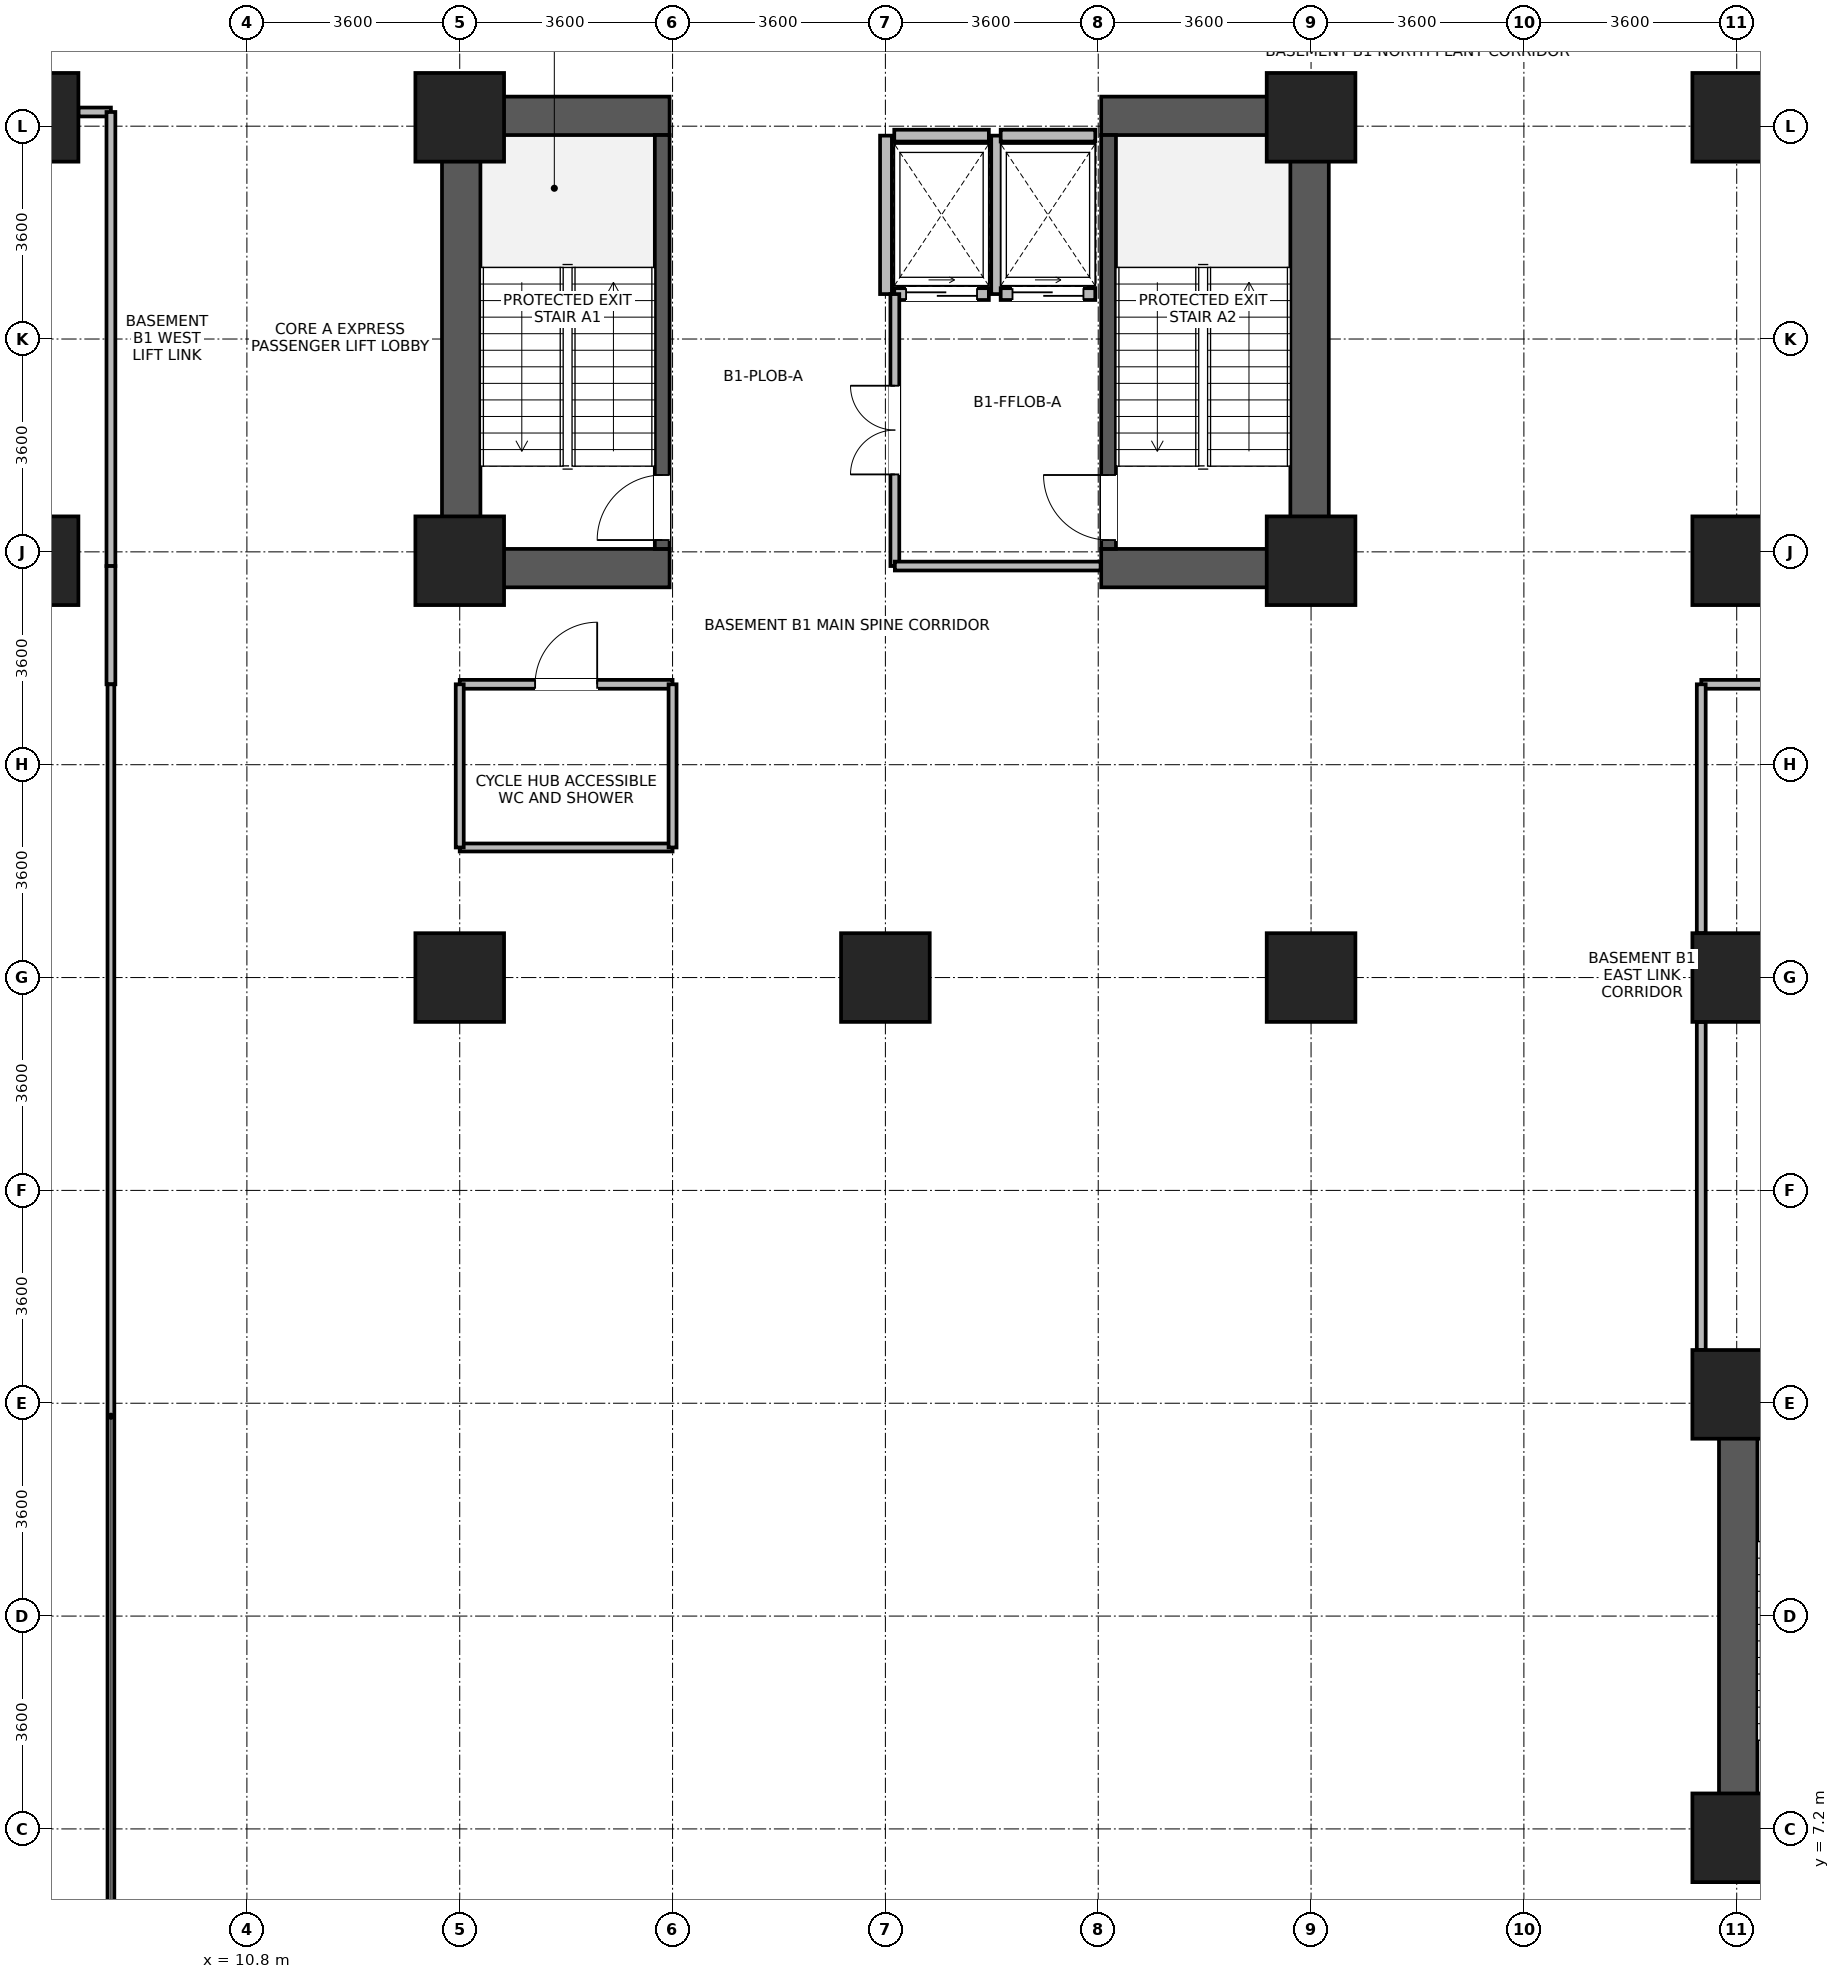
"""IFC4 building model, lengths in metres.
Left out: names, types, materials, properties, quantities, classifications, styles, units other than length and angle.
Written with IfcOpenShell. Run it as: python <this file> out.ifc"""

import sys

from ifc_helpers import new_model, si_unit, direction, frame, frame_2d, origin, origin_2d, place, context, subcontext, project, spatial, rectangle, extrude, source, transform, mapped, element, fill, save


model = new_model("IFC4")
c1 = context("Model", 3, precision=1e-05, world=origin(), true_north=direction((0.0, 1.0)))
c2 = subcontext(c1, "Body", "Model", "MODEL_VIEW")
j1 = project(units=[si_unit("LENGTHUNIT", "METRE"), si_unit("PLANEANGLEUNIT", "RADIAN")], contexts=[c1])
p1 = place(None, origin())
s1 = spatial("IfcSite", under=j1, at=p1, CompositionType="ELEMENT")
p2 = place(p1, origin())
s2 = spatial("IfcBuilding", under=s1, at=p2, CompositionType="ELEMENT")
p3 = place(p2, frame((0.0, 0.0, -4.5)))
s3 = spatial("IfcBuildingStorey", under=s2, at=p3, CompositionType="ELEMENT", Elevation=-4.5)
for number, where, z_axis, x_axis in (
    (1, (14.425, 28.2, 0.0), (0.0, 0.0, 1.0), (0.0, 1.0, 0.0)),
    (2, (28.775, 28.2, 0.0), (0.0, 0.0, 1.0), (0.0, 1.0, 0.0)),
):
    element("IfcWall", number, at=place(p3, frame(where, z_axis=z_axis, x_axis=x_axis)), inside=s3, PredefinedType="SHEAR", context=c2, shape_type="SweptSolid", body=[
        extrude(rectangle(XDim=8.3, YDim=0.65, at=frame_2d((4.15, 0.0))), origin(), (0.0, 0.0, 1.0), 4.15),
    ])
for number, where, z_axis, x_axis in (
    (3, (14.75, 28.525, 0.0), (0.0, 0.0, 1.0), (1.0, 0.0, 0.0)),
    (4, (25.25, 28.525, 0.0), (0.0, 0.0, 1.0), (1.0, 0.0, 0.0)),
    (5, (14.75, 36.175, 0.0), (0.0, 0.0, 1.0), (1.0, 0.0, 0.0)),
    (6, (25.25, 36.175, 0.0), (0.0, 0.0, 1.0), (1.0, 0.0, 0.0)),
):
    element("IfcWall", number, at=place(p3, frame(where, z_axis=z_axis, x_axis=x_axis)), inside=s3, PredefinedType="SHEAR", context=c2, shape_type="SweptSolid", body=[
        extrude(rectangle(XDim=3.2, YDim=0.65, at=frame_2d((1.6, 0.0))), origin(), (0.0, 0.0, 1.0), 4.15),
    ])
p4 = place(p3, frame((17.825, 28.85, 0.0), z_axis=(0.0, 0.0, 1.0), x_axis=(0.0, 1.0, 0.0)))
e7 = element("IfcWall", 7, at=p4, inside=s3, PredefinedType="SHEAR", context=c2, shape_type="SweptSolid", body=[
    extrude(rectangle(XDim=7.0, YDim=0.25, at=frame_2d((3.5, 0.0))), origin(), (0.0, 0.0, 1.0), 4.15),
])
p5 = place(p4, frame((0.15, 0.0, 0.0)))
e8 = element("IfcOpeningElement", 8, at=p5, cuts=e7, PredefinedType="OPENING", context=c2, shape_type="SweptSolid", body=[
    extrude(rectangle(XDim=1.1, YDim=2.08, at=frame_2d((0.55, 1.04))), frame((0.0, 0.135, 0.0), z_axis=(0.0, -1.0, 0.0), x_axis=(1.0, 0.0, 0.0)), (0.0, 0.0, 1.0), 0.27),
])
p6 = place(p3, frame((25.375, 28.85, 0.0), z_axis=(0.0, 0.0, 1.0), x_axis=(0.0, 1.0, 0.0)))
e9 = element("IfcWall", 9, at=p6, inside=s3, PredefinedType="SHEAR", context=c2, shape_type="SweptSolid", body=[
    extrude(rectangle(XDim=7.0, YDim=0.25, at=frame_2d((3.5, 0.0))), origin(), (0.0, 0.0, 1.0), 4.15),
])
p7 = place(p6, frame((0.15, 0.0, 0.0)))
e10 = element("IfcOpeningElement", 10, at=p7, cuts=e9, PredefinedType="OPENING", context=c2, shape_type="SweptSolid", body=[
    extrude(rectangle(XDim=1.1, YDim=2.08, at=frame_2d((0.55, 1.04))), frame((0.0, 0.135, 0.0), z_axis=(0.0, -1.0, 0.0), x_axis=(1.0, 0.0, 0.0)), (0.0, 0.0, 1.0), 0.27),
])
p8 = place(p3, frame((36.025, 6.65, 0.0), z_axis=(0.0, 0.0, 1.0), x_axis=(0.0, 1.0, 0.0)))
e11 = element("IfcWall", 11, at=p8, inside=s3, PredefinedType="SHEAR", context=c2, shape_type="SweptSolid", body=[
    extrude(rectangle(XDim=8.3, YDim=0.65, at=frame_2d((4.15, 0.0))), origin(), (0.0, 0.0, 1.0), 4.15),
])
for number, where, z_axis, x_axis in (
    (12, (36.35, 6.975, 0.0), (0.0, 0.0, 1.0), (1.0, 0.0, 0.0)),
    (13, (36.35, 14.625, 0.0), (0.0, 0.0, 1.0), (1.0, 0.0, 0.0)),
):
    element("IfcWall", number, at=place(p3, frame(where, z_axis=z_axis, x_axis=x_axis)), inside=s3, PredefinedType="SHEAR", context=c2, shape_type="SweptSolid", body=[
        extrude(rectangle(XDim=3.2, YDim=0.65, at=frame_2d((1.6, 0.0))), origin(), (0.0, 0.0, 1.0), 4.15),
    ])
m1 = source(origin(), c2, "Body", "SweptSolid", [
    extrude(rectangle(XDim=1.5, YDim=1.5, at=origin_2d()), origin(), (0.0, 0.0, 1.0), 4.5),
])
for number, where, z_axis, x_axis in (
    (14, (7.2, 28.65, 0.0), (0.0, 0.0, 1.0), (1.0, 0.0, 0.0)),
    (15, (7.2, 36.15, 0.0), (0.0, 0.0, 1.0), (1.0, 0.0, 0.0)),
    (16, (14.4, 21.6, 0.0), (0.0, 0.0, 1.0), (1.0, 0.0, 0.0)),
    (17, (14.4, 28.65, 0.0), (0.0, 0.0, 1.0), (1.0, 0.0, 0.0)),
    (18, (14.4, 36.15, 0.0), (0.0, 0.0, 1.0), (1.0, 0.0, 0.0)),
    (19, (21.6, 21.6, 0.0), (0.0, 0.0, 1.0), (1.0, 0.0, 0.0)),
    (20, (28.8, 21.6, 0.0), (0.0, 0.0, 1.0), (1.0, 0.0, 0.0)),
    (21, (28.8, 28.65, 0.0), (0.0, 0.0, 1.0), (1.0, 0.0, 0.0)),
    (22, (28.8, 36.15, 0.0), (0.0, 0.0, 1.0), (1.0, 0.0, 0.0)),
    (23, (36.0, 21.6, 0.0), (0.0, 0.0, 1.0), (1.0, 0.0, 0.0)),
    (24, (36.0, 28.65, 0.0), (0.0, 0.0, 1.0), (1.0, 0.0, 0.0)),
    (25, (36.0, 36.15, 0.0), (0.0, 0.0, 1.0), (1.0, 0.0, 0.0)),
    (26, (36.0, 7.05, 0.0), (0.0, 0.0, 1.0), (1.0, 0.0, 0.0)),
    (27, (36.0, 14.55, 0.0), (0.0, 0.0, 1.0), (1.0, 0.0, 0.0)),
):
    element("IfcColumn", number, at=place(p3, frame(where, z_axis=z_axis, x_axis=x_axis)), inside=s3, PredefinedType="COLUMN", context=c2, shape_type="MappedRepresentation", body=[
        mapped(m1, transform((0.0, 0.0, 0.0), x_axis=(1.0, 0.0, 0.0), y_axis=(0.0, 1.0, 0.0), z_axis=(0.0, 0.0, 1.0), scale=1.0)),
    ])
p9 = place(p3, frame((21.75, 33.16, 0.0), z_axis=(0.0, 0.0, 1.0), x_axis=(1.0, 0.0, 0.0)))
e28 = element("IfcWall", 28, at=p9, inside=s3, PredefinedType="PARTITIONING", context=c2, shape_type="SweptSolid", body=[
    extrude(rectangle(XDim=1.6, YDim=0.2, at=frame_2d((0.8, 0.0))), origin(), (0.0, 0.0, 1.0), 4.13),
])
p10 = place(p9, frame((0.2, 0.0, 0.0)))
e29 = element("IfcOpeningElement", 29, at=p10, cuts=e28, PredefinedType="OPENING", context=c2, shape_type="SweptSolid", body=[
    extrude(rectangle(XDim=1.2, YDim=2.12, at=frame_2d((0.6, 1.06))), frame((0.0, 0.11, 0.0), z_axis=(0.0, -1.0, 0.0), x_axis=(1.0, 0.0, 0.0)), (0.0, 0.0, 1.0), 0.22),
])
p11 = place(p3, frame((21.75, 35.84, 0.0), z_axis=(0.0, 0.0, 1.0), x_axis=(1.0, 0.0, 0.0)))
e30 = element("IfcWall", 30, at=p11, inside=s3, PredefinedType="PARTITIONING", context=c2, shape_type="SweptSolid", body=[
    extrude(rectangle(XDim=1.6, YDim=0.2, at=frame_2d((0.8, 0.0))), origin(), (0.0, 0.0, 1.0), 2.93),
])
for number, where, z_axis, x_axis in (
    (31, (21.61, 33.16, 0.0), (0.0, 0.0, 1.0), (0.0, 1.0, 0.0)),
    (32, (23.49, 33.16, 0.0), (0.0, 0.0, 1.0), (0.0, 1.0, 0.0)),
):
    element("IfcWall", number, at=place(p3, frame(where, z_axis=z_axis, x_axis=x_axis)), inside=s3, PredefinedType="PARTITIONING", context=c2, shape_type="SweptSolid", body=[
        extrude(rectangle(XDim=2.68, YDim=0.2, at=frame_2d((1.34, 0.0))), origin(), (0.0, 0.0, 1.0), 4.13),
    ])
p12 = place(p3, frame((23.55, 33.16, 0.0), z_axis=(0.0, 0.0, 1.0), x_axis=(1.0, 0.0, 0.0)))
e33 = element("IfcWall", 33, at=p12, inside=s3, PredefinedType="PARTITIONING", context=c2, shape_type="SweptSolid", body=[
    extrude(rectangle(XDim=1.6, YDim=0.2, at=frame_2d((0.8, 0.0))), origin(), (0.0, 0.0, 1.0), 4.13),
])
p13 = place(p12, frame((0.2, 0.0, 0.0)))
e34 = element("IfcOpeningElement", 34, at=p13, cuts=e33, PredefinedType="OPENING", context=c2, shape_type="SweptSolid", body=[
    extrude(rectangle(XDim=1.2, YDim=2.12, at=frame_2d((0.6, 1.06))), frame((0.0, 0.11, 0.0), z_axis=(0.0, -1.0, 0.0), x_axis=(1.0, 0.0, 0.0)), (0.0, 0.0, 1.0), 0.22),
])
p14 = place(p3, frame((23.55, 35.84, 0.0), z_axis=(0.0, 0.0, 1.0), x_axis=(1.0, 0.0, 0.0)))
e35 = element("IfcWall", 35, at=p14, inside=s3, PredefinedType="PARTITIONING", context=c2, shape_type="SweptSolid", body=[
    extrude(rectangle(XDim=1.6, YDim=0.2, at=frame_2d((0.8, 0.0))), origin(), (0.0, 0.0, 1.0), 2.93),
])
p15 = place(p3, frame((7.95, 36.24, 0.0), z_axis=(0.0, 0.0, 1.0), x_axis=(1.0, 0.0, 0.0)))
e36 = element("IfcWall", 36, at=p15, inside=s3, PredefinedType="PARTITIONING", context=c2, shape_type="SweptSolid", body=[
    extrude(rectangle(XDim=0.55, YDim=0.15, at=frame_2d((0.275, 0.0))), origin(), (0.0, 0.0, 1.0), 3.43),
])
p16 = place(p3, frame((35.4, 26.56, 0.0), z_axis=(0.0, 0.0, 1.0), x_axis=(1.0, 0.0, 0.0)))
e37 = element("IfcWall", 37, at=p16, inside=s3, PredefinedType="PARTITIONING", context=c2, shape_type="SweptSolid", body=[
    extrude(rectangle(XDim=18.6, YDim=0.15, at=frame_2d((9.3, 0.0))), origin(), (0.0, 0.0, 1.0), 4.13),
])
p17 = place(p16, frame((8.87, 0.0, 0.0)))
e38 = element("IfcOpeningElement", 38, at=p17, cuts=e37, PredefinedType="OPENING", context=c2, shape_type="SweptSolid", body=[
    extrude(rectangle(XDim=0.86, YDim=2.02, at=frame_2d((0.43, 1.01))), frame((0.0, 0.085, 0.0), z_axis=(0.0, -1.0, 0.0), x_axis=(1.0, 0.0, 0.0)), (0.0, 0.0, 1.0), 0.17),
])
p18 = place(p3, frame((35.4, 15.3, 0.0), z_axis=(0.0, 0.0, 1.0), x_axis=(0.0, 1.0, 0.0)))
e39 = element("IfcWall", 39, at=p18, inside=s3, PredefinedType="PARTITIONING", context=c2, shape_type="SweptSolid", body=[
    extrude(rectangle(XDim=5.55, YDim=0.15, at=frame_2d((2.775, 0.0))), origin(), (0.0, 0.0, 1.0), 4.13),
])
p19 = place(p3, frame((35.4, 22.35, 0.0), z_axis=(0.0, 0.0, 1.0), x_axis=(0.0, 1.0, 0.0)))
e40 = element("IfcWall", 40, at=p19, inside=s3, PredefinedType="PARTITIONING", context=c2, shape_type="SweptSolid", body=[
    extrude(rectangle(XDim=4.21, YDim=0.15, at=frame_2d((2.105, 0.0))), origin(), (0.0, 0.0, 1.0), 4.13),
])
p20 = place(p3, frame((8.5, 28.56, 0.0), z_axis=(0.0, 0.0, 1.0), x_axis=(0.0, 1.0, 0.0)))
e41 = element("IfcWall", 41, at=p20, inside=s3, PredefinedType="PARTITIONING", context=c2, shape_type="SweptSolid", body=[
    extrude(rectangle(XDim=7.68, YDim=0.15, at=frame_2d((3.84, 0.0))), origin(), (0.0, 0.0, 1.0), 4.13),
])
p21 = place(p3, frame((14.4, 26.56, 0.0), z_axis=(0.0, 0.0, 1.0), x_axis=(1.0, 0.0, 0.0)))
e42 = element("IfcWall", 42, at=p21, inside=s3, PredefinedType="PARTITIONING", context=c2, shape_type="SweptSolid", body=[
    extrude(rectangle(XDim=3.6, YDim=0.15, at=frame_2d((1.8, 0.0))), origin(), (0.0, 0.0, 1.0), 4.13),
])
p22 = place(p21, frame((1.275, 0.0, 0.0)))
e43 = element("IfcOpeningElement", 43, at=p22, cuts=e42, PredefinedType="OPENING", context=c2, shape_type="SweptSolid", body=[
    extrude(rectangle(XDim=1.05, YDim=2.12, at=frame_2d((0.525, 1.06))), frame((0.0, 0.085, 0.0), z_axis=(0.0, -1.0, 0.0), x_axis=(1.0, 0.0, 0.0)), (0.0, 0.0, 1.0), 0.17),
])
p23 = place(p3, frame((8.5, 26.56, 0.0), z_axis=(0.0, 0.0, 1.0), x_axis=(0.0, 1.0, 0.0)))
e44 = element("IfcWall", 44, at=p23, inside=s3, PredefinedType="PARTITIONING", context=c2, shape_type="SweptSolid", body=[
    extrude(rectangle(XDim=2.0, YDim=0.15, at=frame_2d((1.0, 0.0))), origin(), (0.0, 0.0, 1.0), 4.13),
])
p24 = place(p3, frame((8.5, 1.8, 0.0), z_axis=(0.0, 0.0, 1.0), x_axis=(0.0, 1.0, 0.0)))
e45 = element("IfcWall", 45, at=p24, inside=s3, PredefinedType="PARTITIONING", context=c2, shape_type="SweptSolid", body=[
    extrude(rectangle(XDim=24.76, YDim=0.115, at=frame_2d((12.38, 0.0))), origin(), (0.0, 0.0, 1.0), 4.13),
])
p25 = place(p3, frame((21.76, 28.56, 0.0), z_axis=(0.0, 0.0, 1.0), x_axis=(0.0, 1.0, 0.0)))
e46 = element("IfcWall", 46, at=p25, inside=s3, PredefinedType="PARTITIONING", context=c2, shape_type="SweptSolid", body=[
    extrude(rectangle(XDim=4.6, YDim=0.15, at=frame_2d((2.3, 0.0))), origin(), (0.0, 0.0, 1.0), 4.13),
])
p26 = place(p25, frame((1.55, 0.0, 0.0)))
e47 = element("IfcOpeningElement", 47, at=p26, cuts=e46, PredefinedType="OPENING", context=c2, shape_type="SweptSolid", body=[
    extrude(rectangle(XDim=1.5, YDim=2.1, at=frame_2d((0.75, 1.05))), frame((0.0, 0.085, 0.0), z_axis=(0.0, -1.0, 0.0), x_axis=(1.0, 0.0, 0.0)), (0.0, 0.0, 1.0), 0.17),
])
p27 = place(p3, frame((14.4, 23.8, 0.0), z_axis=(0.0, 0.0, 1.0), x_axis=(1.0, 0.0, 0.0)))
e48 = element("IfcWall", 48, at=p27, inside=s3, PredefinedType="PARTITIONING", context=c2, shape_type="SweptSolid", body=[
    extrude(rectangle(XDim=3.6, YDim=0.135, at=frame_2d((1.8, 0.0))), origin(), (0.0, 0.0, 1.0), 4.13),
])
p28 = place(p3, frame((21.76, 28.56, 0.0), z_axis=(0.0, 0.0, 1.0), x_axis=(1.0, 0.0, 0.0)))
e49 = element("IfcWall", 49, at=p28, inside=s3, PredefinedType="PARTITIONING", context=c2, shape_type="SweptSolid", body=[
    extrude(rectangle(XDim=3.48, YDim=0.15, at=frame_2d((1.74, 0.0))), origin(), (0.0, 0.0, 1.0), 2.93),
])
p29 = place(p3, frame((14.4, 23.8, 0.0), z_axis=(0.0, 0.0, 1.0), x_axis=(0.0, 1.0, 0.0)))
e50 = element("IfcWall", 50, at=p29, inside=s3, PredefinedType="PARTITIONING", context=c2, shape_type="SweptSolid", body=[
    extrude(rectangle(XDim=2.76, YDim=0.135, at=frame_2d((1.38, 0.0))), origin(), (0.0, 0.0, 1.0), 3.53),
])
p30 = place(p3, frame((18.0, 23.8, 0.0), z_axis=(0.0, 0.0, 1.0), x_axis=(0.0, 1.0, 0.0)))
e51 = element("IfcWall", 51, at=p30, inside=s3, PredefinedType="PARTITIONING", context=c2, shape_type="SweptSolid", body=[
    extrude(rectangle(XDim=2.76, YDim=0.135, at=frame_2d((1.38, 0.0))), origin(), (0.0, 0.0, 1.0), 4.13),
])
p31 = place(p5, origin())
e52 = element("IfcDoor", 52, at=p31, inside=s3, OperationType="SINGLE_SWING_LEFT", PredefinedType="DOOR", context=c2, shape_type="SweptSolid", body=[
    extrude(rectangle(XDim=1.1, YDim=2.08, at=frame_2d((0.55, 1.04))), frame((0.0, 0.025, 0.0), z_axis=(0.0, -1.0, 0.0), x_axis=(1.0, 0.0, 0.0)), (0.0, 0.0, 1.0), 0.05),
])
fill(e8, e52)
p32 = place(p7, origin())
e53 = element("IfcDoor", 53, at=p32, inside=s3, OperationType="SINGLE_SWING_RIGHT", PredefinedType="DOOR", context=c2, shape_type="SweptSolid", body=[
    extrude(rectangle(XDim=1.1, YDim=2.08, at=frame_2d((0.55, 1.04))), frame((0.0, 0.025, 0.0), z_axis=(0.0, -1.0, 0.0), x_axis=(1.0, 0.0, 0.0)), (0.0, 0.0, 1.0), 0.05),
])
fill(e10, e53)
p33 = place(p10, origin())
e54 = element("IfcDoor", 54, at=p33, inside=s3, OperationType="SLIDING_TO_RIGHT", PredefinedType="DOOR", context=c2, shape_type="SweptSolid", body=[
    extrude(rectangle(XDim=1.2, YDim=2.12, at=frame_2d((0.6, 1.06))), frame((0.0, 0.025, 0.0), z_axis=(0.0, -1.0, 0.0), x_axis=(1.0, 0.0, 0.0)), (0.0, 0.0, 1.0), 0.05),
])
fill(e29, e54)
p34 = place(p13, origin())
e55 = element("IfcDoor", 55, at=p34, inside=s3, OperationType="SLIDING_TO_RIGHT", PredefinedType="DOOR", context=c2, shape_type="SweptSolid", body=[
    extrude(rectangle(XDim=1.2, YDim=2.12, at=frame_2d((0.6, 1.06))), frame((0.0, 0.025, 0.0), z_axis=(0.0, -1.0, 0.0), x_axis=(1.0, 0.0, 0.0)), (0.0, 0.0, 1.0), 0.05),
])
fill(e34, e55)
p35 = place(p22, origin())
e56 = element("IfcDoor", 56, at=p35, inside=s3, OperationType="SINGLE_SWING_RIGHT", PredefinedType="DOOR", context=c2, shape_type="SweptSolid", body=[
    extrude(rectangle(XDim=1.05, YDim=2.12, at=frame_2d((0.525, 1.06))), frame((0.0, 0.025, 0.0), z_axis=(0.0, -1.0, 0.0), x_axis=(1.0, 0.0, 0.0)), (0.0, 0.0, 1.0), 0.05),
])
fill(e43, e56)
p36 = place(p26, origin())
e57 = element("IfcDoor", 57, at=p36, inside=s3, OperationType="DOUBLE_DOOR_SINGLE_SWING", PredefinedType="DOOR", context=c2, shape_type="SweptSolid", body=[
    extrude(rectangle(XDim=1.5, YDim=2.1, at=frame_2d((0.75, 1.05))), frame((0.0, 0.025, 0.0), z_axis=(0.0, -1.0, 0.0), x_axis=(1.0, 0.0, 0.0)), (0.0, 0.0, 1.0), 0.05),
])
fill(e47, e57)
save(model, sys.argv[1])
